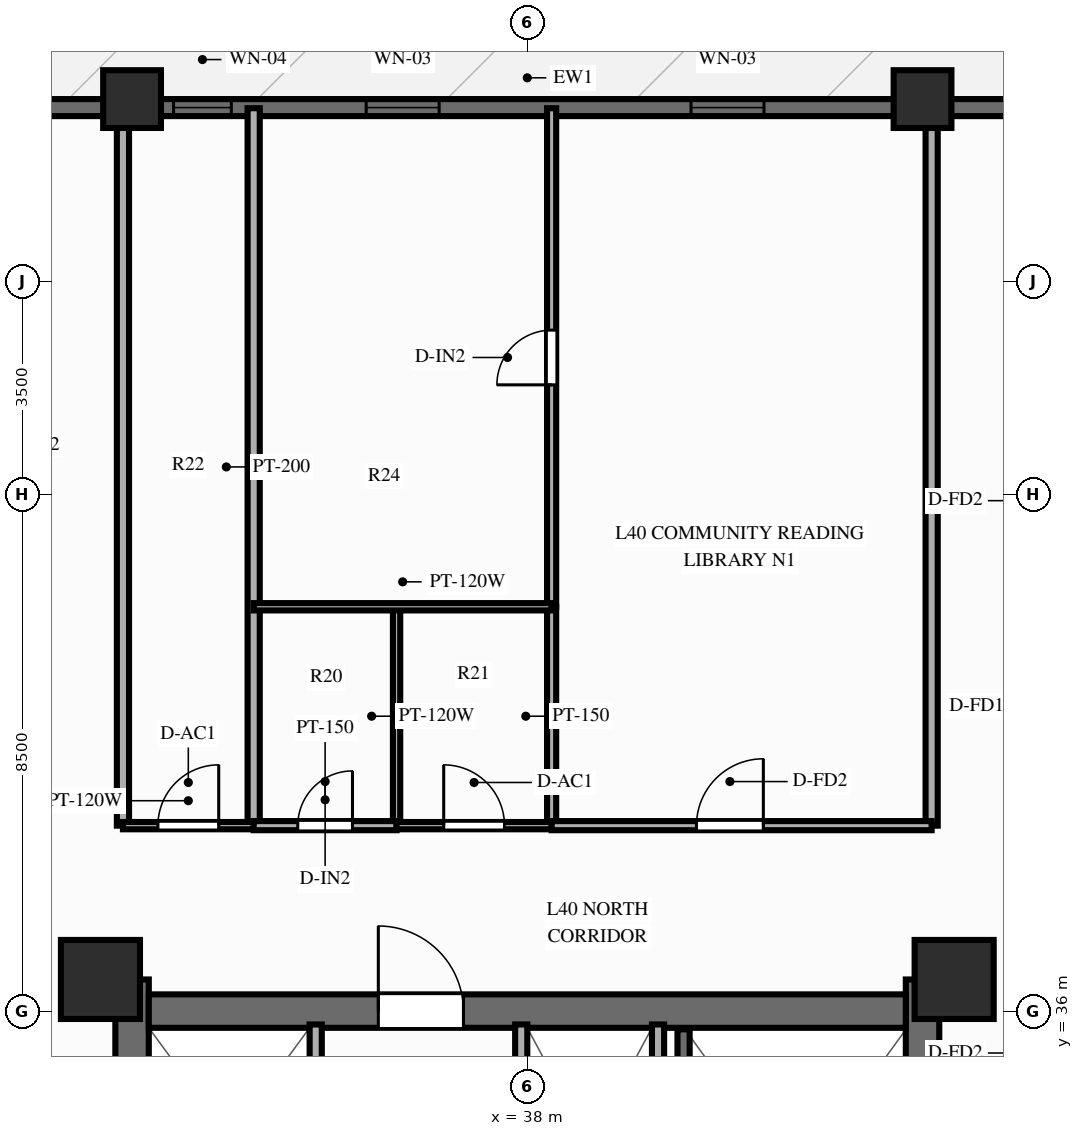
"""IFC4 building model, lengths in metres.
Left out: names, types, materials, properties, quantities, classifications, styles, units other than length and angle.
Written with IfcOpenShell. Run it as: python <this file> out.ifc"""

import sys

from ifc_helpers import new_model, si_unit, direction, frame, frame_2d, origin, origin_2d, place, context, subcontext, project, spatial, rectangle, extrude, source, transform, mapped, element, fill, save


model = new_model("IFC4")
c1 = context("Model", 3, precision=1e-05, world=origin(), true_north=direction((0.0, 1.0)))
c2 = subcontext(c1, "Body", "Model", "MODEL_VIEW")
j1 = project(units=[si_unit("LENGTHUNIT", "METRE"), si_unit("PLANEANGLEUNIT", "RADIAN")], contexts=[c1])
p1 = place(None, origin())
s1 = spatial("IfcSite", under=j1, at=p1, CompositionType="ELEMENT")
p2 = place(p1, origin())
s2 = spatial("IfcBuilding", under=s1, at=p2, CompositionType="ELEMENT")
p3 = place(p2, frame((0.0, 0.0, 126.75)))
s3 = spatial("IfcBuildingStorey", under=s2, at=p3, CompositionType="ELEMENT", Elevation=126.75)
p4 = place(p3, frame((31.5, 17.48, 0.0), z_axis=(0.0, 0.0, 1.0), x_axis=(0.0, 1.0, 0.0)))
e1 = element("IfcWall", 1, at=p4, inside=s3, PredefinedType="SHEAR", context=c2, shape_type="SweptSolid", body=[
    extrude(rectangle(XDim=19.04, YDim=0.55, at=frame_2d((9.52, 0.0))), origin(), (0.0, 0.0, 1.0), 3.0),
])
p5 = place(p4, frame((6.32, 0.0, 0.0)))
e2 = element("IfcOpeningElement", 2, at=p5, cuts=e1, PredefinedType="OPENING", context=c2, shape_type="SweptSolid", body=[
    extrude(rectangle(XDim=1.1, YDim=2.15, at=frame_2d((0.55, 1.075))), frame((0.0, 0.287, 0.0), z_axis=(0.0, -1.0, 0.0), x_axis=(1.0, 0.0, 0.0)), (0.0, 0.0, 1.0), 0.574),
])
p6 = place(p3, frame((44.5, 17.48, 0.0), z_axis=(0.0, 0.0, 1.0), x_axis=(0.0, 1.0, 0.0)))
e3 = element("IfcWall", 3, at=p6, inside=s3, PredefinedType="SHEAR", context=c2, shape_type="SweptSolid", body=[
    extrude(rectangle(XDim=19.04, YDim=0.55, at=frame_2d((9.52, 0.0))), origin(), (0.0, 0.0, 1.0), 3.0),
])
p7 = place(p6, frame((12.67, 0.0, 0.0), z_axis=(0.0, 0.0, 1.0), x_axis=(-1.0, 0.0, 0.0)))
e4 = element("IfcOpeningElement", 4, at=p7, cuts=e3, PredefinedType="OPENING", context=c2, shape_type="SweptSolid", body=[
    extrude(rectangle(XDim=1.1, YDim=2.15, at=frame_2d((0.55, 1.075))), frame((0.0, 0.287, 0.0), z_axis=(0.0, -1.0, 0.0), x_axis=(1.0, 0.0, 0.0)), (0.0, 0.0, 1.0), 0.574),
])
p8 = place(p3, frame((31.775, 36.0, 0.0), z_axis=(0.0, 0.0, 1.0), x_axis=(1.0, 0.0, 0.0)))
e5 = element("IfcWall", 5, at=p8, inside=s3, PredefinedType="SHEAR", context=c2, shape_type="SweptSolid", body=[
    extrude(rectangle(XDim=12.45, YDim=0.55, at=frame_2d((6.225, 0.0))), origin(), (0.0, 0.0, 1.0), 3.0),
])
p9 = place(p8, frame((5.175, 0.0, 0.0), z_axis=(0.0, 0.0, 1.0), x_axis=(-1.0, 0.0, 0.0)))
e6 = element("IfcOpeningElement", 6, at=p9, cuts=e5, PredefinedType="OPENING", context=c2, shape_type="SweptSolid", body=[
    extrude(rectangle(XDim=1.4, YDim=2.15, at=frame_2d((0.7, 1.075))), frame((0.0, 0.287, 0.0), z_axis=(0.0, -1.0, 0.0), x_axis=(1.0, 0.0, 0.0)), (0.0, 0.0, 1.0), 0.574),
])
m1 = source(origin(), c2, "Body", "SweptSolid", [
    extrude(rectangle(XDim=1.3, YDim=1.3, at=origin_2d()), origin(), (0.0, 0.0, 1.0), 3.0),
])
for number, where, z_axis, x_axis in (
    (7, (30.98, 36.52, 0.0), (0.0, 0.0, 1.0), (1.0, 0.0, 0.0)),
    (8, (45.02, 36.52, 0.0), (0.0, 0.0, 1.0), (1.0, 0.0, 0.0)),
):
    element("IfcColumn", number, at=place(p3, frame(where, z_axis=z_axis, x_axis=x_axis)), inside=s3, PredefinedType="COLUMN", context=c2, shape_type="MappedRepresentation", body=[
        mapped(m1, transform((0.0, 0.0, 0.0), scale=1.0)),
    ])
m2 = source(origin(), c2, "Body", "SweptSolid", [
    extrude(rectangle(XDim=0.95, YDim=0.95, at=origin_2d()), origin(), (0.0, 0.0, 1.0), 3.0),
])
for number, where, z_axis, x_axis in (
    (9, (44.5, 51.0, 0.0), (0.0, 0.0, 1.0), (1.0, 0.0, 0.0)),
    (10, (31.5, 51.0, 0.0), (0.0, 0.0, 1.0), (1.0, 0.0, 0.0)),
):
    element("IfcColumn", number, at=place(p3, frame(where, z_axis=z_axis, x_axis=x_axis)), inside=s3, PredefinedType="COLUMN", context=c2, shape_type="MappedRepresentation", body=[
        mapped(m2, transform((0.0, 0.0, 0.0), scale=1.0)),
    ])
p10 = place(p3, frame((16.2, 50.86, 0.0), z_axis=(0.0, 0.0, 1.0), x_axis=(1.0, 0.0, 0.0)))
e11 = element("IfcWall", 11, at=p10, inside=s3, PredefinedType="SOLIDWALL", context=c2, shape_type="SweptSolid", body=[
    extrude(rectangle(XDim=43.6, YDim=0.28, at=frame_2d((21.8, 0.0))), origin(), (0.0, 0.0, 1.0), 2.28),
])
p11 = place(p10, frame((7.1, 0.0, 0.0)))
e12 = element("IfcOpeningElement", 12, at=p11, cuts=e11, PredefinedType="OPENING", context=c2, shape_type="SweptSolid", body=[
    extrude(rectangle(XDim=1.1, YDim=2.15, at=frame_2d((0.55, 1.075))), frame((0.0, 0.152, 0.0), z_axis=(0.0, -1.0, 0.0), x_axis=(1.0, 0.0, 0.0)), (0.0, 0.0, 1.0), 0.304),
])
p12 = place(p10, frame((15.982, 0.0, 0.25)))
e13 = element("IfcOpeningElement", 13, at=p12, cuts=e11, PredefinedType="OPENING", context=c2, shape_type="SweptSolid", body=[
    extrude(rectangle(XDim=0.95, YDim=1.5, at=frame_2d((0.475, 0.75))), frame((0.0, 0.152, 0.0), z_axis=(0.0, -1.0, 0.0), x_axis=(1.0, 0.0, 0.0)), (0.0, 0.0, 1.0), 0.304),
])
p13 = place(p10, frame((19.15, 0.0, 0.25)))
e14 = element("IfcOpeningElement", 14, at=p13, cuts=e11, PredefinedType="OPENING", context=c2, shape_type="SweptSolid", body=[
    extrude(rectangle(XDim=1.2, YDim=1.5, at=frame_2d((0.6, 0.75))), frame((0.0, 0.152, 0.0), z_axis=(0.0, -1.0, 0.0), x_axis=(1.0, 0.0, 0.0)), (0.0, 0.0, 1.0), 0.304),
])
p14 = place(p10, frame((24.492, 0.0, 0.25)))
e15 = element("IfcOpeningElement", 15, at=p14, cuts=e11, PredefinedType="OPENING", context=c2, shape_type="SweptSolid", body=[
    extrude(rectangle(XDim=1.2, YDim=1.5, at=frame_2d((0.6, 0.75))), frame((0.0, 0.152, 0.0), z_axis=(0.0, -1.0, 0.0), x_axis=(1.0, 0.0, 0.0)), (0.0, 0.0, 1.0), 0.304),
])
p15 = place(p10, frame((35.35, 0.0, 0.25)))
e16 = element("IfcOpeningElement", 16, at=p15, cuts=e11, PredefinedType="OPENING", context=c2, shape_type="SweptSolid", body=[
    extrude(rectangle(XDim=1.2, YDim=1.5, at=frame_2d((0.6, 0.75))), frame((0.0, 0.152, 0.0), z_axis=(0.0, -1.0, 0.0), x_axis=(1.0, 0.0, 0.0)), (0.0, 0.0, 1.0), 0.304),
])
p16 = place(p3, frame((40.15, 31.8, 0.0), z_axis=(0.0, 0.0, 1.0), x_axis=(0.0, 1.0, 0.0)))
e17 = element("IfcWall", 17, at=p16, inside=s3, PredefinedType="PARTITIONING", context=c2, shape_type="SweptSolid", body=[
    extrude(rectangle(XDim=3.98, YDim=0.2, at=frame_2d((1.99, 0.0))), origin(), (0.0, 0.0, 1.0), 2.79),
])
p17 = place(p3, frame((40.57, 28.65, 0.0), z_axis=(0.0, 0.0, 1.0), x_axis=(0.0, 1.0, 0.0)))
e18 = element("IfcWall", 18, at=p17, inside=s3, PredefinedType="SOLIDWALL", context=c2, shape_type="SweptSolid", body=[
    extrude(rectangle(XDim=7.05, YDim=0.2, at=frame_2d((3.525, 0.0))), origin(), (0.0, 0.0, 1.0), 2.79),
])
p18 = place(p3, frame((34.52, 25.44, 0.0), z_axis=(0.0, 0.0, 1.0), x_axis=(0.0, 1.0, 0.0)))
e19 = element("IfcWall", 19, at=p18, inside=s3, PredefinedType="PARTITIONING", context=c2, shape_type="SweptSolid", body=[
    extrude(rectangle(XDim=10.34, YDim=0.2, at=frame_2d((5.17, 0.0))), origin(), (0.0, 0.0, 1.0), 2.79),
])
p19 = place(p18, frame((0.65, 0.0, 0.0)))
e20 = element("IfcOpeningElement", 20, at=p19, cuts=e19, PredefinedType="OPENING", context=c2, shape_type="SweptSolid", body=[
    extrude(rectangle(XDim=0.8, YDim=2.05, at=frame_2d((0.4, 1.025))), frame((0.0, 0.112, 0.0), z_axis=(0.0, -1.0, 0.0), x_axis=(1.0, 0.0, 0.0)), (0.0, 0.0, 1.0), 0.224),
])
p20 = place(p18, frame((2.75, 0.0, 0.0)))
e21 = element("IfcOpeningElement", 21, at=p20, cuts=e19, PredefinedType="OPENING", context=c2, shape_type="SweptSolid", body=[
    extrude(rectangle(XDim=0.8, YDim=2.05, at=frame_2d((0.4, 1.025))), frame((0.0, 0.112, 0.0), z_axis=(0.0, -1.0, 0.0), x_axis=(1.0, 0.0, 0.0)), (0.0, 0.0, 1.0), 0.224),
])
p21 = place(p18, frame((4.95, 0.0, 0.0)))
e22 = element("IfcOpeningElement", 22, at=p21, cuts=e19, PredefinedType="OPENING", context=c2, shape_type="SweptSolid", body=[
    extrude(rectangle(XDim=0.8, YDim=2.05, at=frame_2d((0.4, 1.025))), frame((0.0, 0.112, 0.0), z_axis=(0.0, -1.0, 0.0), x_axis=(1.0, 0.0, 0.0)), (0.0, 0.0, 1.0), 0.224),
])
p22 = place(p3, frame((37.9, 25.44, 0.0), z_axis=(0.0, 0.0, 1.0), x_axis=(0.0, 1.0, 0.0)))
e23 = element("IfcWall", 23, at=p22, inside=s3, PredefinedType="PARTITIONING", context=c2, shape_type="SweptSolid", body=[
    extrude(rectangle(XDim=10.34, YDim=0.2, at=frame_2d((5.17, 0.0))), origin(), (0.0, 0.0, 1.0), 2.79),
])
p23 = place(p22, frame((0.32, 0.0, 0.0)))
e24 = element("IfcOpeningElement", 24, at=p23, cuts=e23, PredefinedType="OPENING", context=c2, shape_type="SweptSolid", body=[
    extrude(rectangle(XDim=1.0, YDim=2.15, at=frame_2d((0.5, 1.075))), frame((0.0, 0.112, 0.0), z_axis=(0.0, -1.0, 0.0), x_axis=(1.0, 0.0, 0.0)), (0.0, 0.0, 1.0), 0.224),
])
p24 = place(p22, frame((1.71, 0.0, 0.0)))
e25 = element("IfcOpeningElement", 25, at=p24, cuts=e23, PredefinedType="OPENING", context=c2, shape_type="SweptSolid", body=[
    extrude(rectangle(XDim=1.0, YDim=2.15, at=frame_2d((0.5, 1.075))), frame((0.0, 0.112, 0.0), z_axis=(0.0, -1.0, 0.0), x_axis=(1.0, 0.0, 0.0)), (0.0, 0.0, 1.0), 0.224),
])
p25 = place(p22, frame((3.51, 0.0, 0.0)))
e26 = element("IfcOpeningElement", 26, at=p25, cuts=e23, PredefinedType="OPENING", context=c2, shape_type="SweptSolid", body=[
    extrude(rectangle(XDim=1.0, YDim=2.15, at=frame_2d((0.5, 1.075))), frame((0.0, 0.112, 0.0), z_axis=(0.0, -1.0, 0.0), x_axis=(1.0, 0.0, 0.0)), (0.0, 0.0, 1.0), 0.224),
])
p26 = place(p22, frame((5.01, 0.0, 0.0)))
e27 = element("IfcOpeningElement", 27, at=p26, cuts=e23, PredefinedType="OPENING", context=c2, shape_type="SweptSolid", body=[
    extrude(rectangle(XDim=1.0, YDim=2.15, at=frame_2d((0.5, 1.075))), frame((0.0, 0.112, 0.0), z_axis=(0.0, -1.0, 0.0), x_axis=(1.0, 0.0, 0.0)), (0.0, 0.0, 1.0), 0.224),
])
for number, where, z_axis, x_axis in (
    (28, (31.35, 39.05, 0.0), (0.0, 0.0, 1.0), (0.0, 1.0, 0.0)),
    (29, (44.65, 39.05, 0.0), (0.0, 0.0, 1.0), (0.0, 1.0, 0.0)),
):
    element("IfcWall", number, at=place(p3, frame(where, z_axis=z_axis, x_axis=x_axis)), inside=s3, PredefinedType="PARTITIONING", context=c2, shape_type="SweptSolid", body=[
        extrude(rectangle(XDim=11.8, YDim=0.2, at=frame_2d((5.9, 0.0))), origin(), (0.0, 0.0, 1.0), 2.34),
    ])
p27 = place(p3, frame((33.5, 39.05, 0.0), z_axis=(0.0, 0.0, 1.0), x_axis=(0.0, 1.0, 0.0)))
e30 = element("IfcWall", 30, at=p27, inside=s3, PredefinedType="PARTITIONING", context=c2, shape_type="SweptSolid", body=[
    extrude(rectangle(XDim=11.8, YDim=0.2, at=frame_2d((5.9, 0.0))), origin(), (0.0, 0.0, 1.0), 2.79),
])
p28 = place(p3, frame((31.35, 39.05, 0.0), z_axis=(0.0, 0.0, 1.0), x_axis=(1.0, 0.0, 0.0)))
e31 = element("IfcWall", 31, at=p28, inside=s3, PredefinedType="PARTITIONING", context=c2, shape_type="SweptSolid", body=[
    extrude(rectangle(XDim=2.15, YDim=0.12, at=frame_2d((1.075, 0.0))), origin(), (0.0, 0.0, 1.0), 2.79),
])
p29 = place(p28, frame((0.575, 0.0, 0.0)))
e32 = element("IfcOpeningElement", 32, at=p29, cuts=e31, PredefinedType="OPENING", context=c2, shape_type="SweptSolid", body=[
    extrude(rectangle(XDim=1.0, YDim=2.1, at=frame_2d((0.5, 1.05))), frame((0.0, 0.072, 0.0), z_axis=(0.0, -1.0, 0.0), x_axis=(1.0, 0.0, 0.0)), (0.0, 0.0, 1.0), 0.144),
])
p30 = place(p3, frame((35.85, 39.05, 0.0), z_axis=(0.0, 0.0, 1.0), x_axis=(0.0, 1.0, 0.0)))
e33 = element("IfcWall", 33, at=p30, inside=s3, PredefinedType="PARTITIONING", context=c2, shape_type="SweptSolid", body=[
    extrude(rectangle(XDim=3.6, YDim=0.12, at=frame_2d((1.8, 0.0))), origin(), (0.0, 0.0, 1.0), 2.79),
])
p31 = place(p3, frame((38.4, 39.05, 0.0), z_axis=(0.0, 0.0, 1.0), x_axis=(0.0, 1.0, 0.0)))
e34 = element("IfcWall", 34, at=p31, inside=s3, PredefinedType="PARTITIONING", context=c2, shape_type="SweptSolid", body=[
    extrude(rectangle(XDim=3.6, YDim=0.15, at=frame_2d((1.8, 0.0))), origin(), (0.0, 0.0, 1.0), 2.79),
])
p32 = place(p3, frame((38.4, 42.65, 0.0), z_axis=(0.0, 0.0, 1.0), x_axis=(0.0, 1.0, 0.0)))
e35 = element("IfcWall", 35, at=p32, inside=s3, PredefinedType="PARTITIONING", context=c2, shape_type="SweptSolid", body=[
    extrude(rectangle(XDim=8.2, YDim=0.15, at=frame_2d((4.1, 0.0))), origin(), (0.0, 0.0, 1.0), 2.79),
])
p33 = place(p32, frame((3.65, 0.0, 0.0)))
e36 = element("IfcOpeningElement", 36, at=p33, cuts=e35, PredefinedType="OPENING", context=c2, shape_type="SweptSolid", body=[
    extrude(rectangle(XDim=0.9, YDim=2.1, at=frame_2d((0.45, 1.05))), frame((0.0, 0.087, 0.0), z_axis=(0.0, -1.0, 0.0), x_axis=(1.0, 0.0, 0.0)), (0.0, 0.0, 1.0), 0.174),
])
p34 = place(p3, frame((33.5, 42.65, 0.0), z_axis=(0.0, 0.0, 1.0), x_axis=(1.0, 0.0, 0.0)))
e37 = element("IfcWall", 37, at=p34, inside=s3, PredefinedType="PARTITIONING", context=c2, shape_type="SweptSolid", body=[
    extrude(rectangle(XDim=4.9, YDim=0.12, at=frame_2d((2.45, 0.0))), origin(), (0.0, 0.0, 1.0), 2.79),
])
p35 = place(p3, frame((33.5, 39.05, 0.0), z_axis=(0.0, 0.0, 1.0), x_axis=(1.0, 0.0, 0.0)))
e38 = element("IfcWall", 38, at=p35, inside=s3, PredefinedType="PARTITIONING", context=c2, shape_type="SweptSolid", body=[
    extrude(rectangle(XDim=2.35, YDim=0.15, at=frame_2d((1.175, 0.0))), origin(), (0.0, 0.0, 1.0), 2.79),
])
p36 = place(p35, frame((0.725, 0.0, 0.0)))
e39 = element("IfcOpeningElement", 39, at=p36, cuts=e38, PredefinedType="OPENING", context=c2, shape_type="SweptSolid", body=[
    extrude(rectangle(XDim=0.9, YDim=2.1, at=frame_2d((0.45, 1.05))), frame((0.0, 0.087, 0.0), z_axis=(0.0, -1.0, 0.0), x_axis=(1.0, 0.0, 0.0)), (0.0, 0.0, 1.0), 0.174),
])
p37 = place(p3, frame((35.85, 39.05, 0.0), z_axis=(0.0, 0.0, 1.0), x_axis=(1.0, 0.0, 0.0)))
e40 = element("IfcWall", 40, at=p37, inside=s3, PredefinedType="PARTITIONING", context=c2, shape_type="SweptSolid", body=[
    extrude(rectangle(XDim=2.55, YDim=0.12, at=frame_2d((1.275, 0.0))), origin(), (0.0, 0.0, 1.0), 2.79),
])
p38 = place(p37, frame((0.775, 0.0, 0.0)))
e41 = element("IfcOpeningElement", 41, at=p38, cuts=e40, PredefinedType="OPENING", context=c2, shape_type="SweptSolid", body=[
    extrude(rectangle(XDim=1.0, YDim=2.1, at=frame_2d((0.5, 1.05))), frame((0.0, 0.072, 0.0), z_axis=(0.0, -1.0, 0.0), x_axis=(1.0, 0.0, 0.0)), (0.0, 0.0, 1.0), 0.144),
])
p39 = place(p3, frame((38.4, 39.05, 0.0), z_axis=(0.0, 0.0, 1.0), x_axis=(1.0, 0.0, 0.0)))
e42 = element("IfcWall", 42, at=p39, inside=s3, PredefinedType="PARTITIONING", context=c2, shape_type="SweptSolid", body=[
    extrude(rectangle(XDim=6.25, YDim=0.15, at=frame_2d((3.125, 0.0))), origin(), (0.0, 0.0, 1.0), 2.79),
])
p40 = place(p39, frame((2.382, 0.0, 0.0)))
e43 = element("IfcOpeningElement", 43, at=p40, cuts=e42, PredefinedType="OPENING", context=c2, shape_type="SweptSolid", body=[
    extrude(rectangle(XDim=1.1, YDim=2.15, at=frame_2d((0.55, 1.075))), frame((0.0, 0.087, 0.0), z_axis=(0.0, -1.0, 0.0), x_axis=(1.0, 0.0, 0.0)), (0.0, 0.0, 1.0), 0.174),
])
m3 = source(origin(), c2, "Body", "SweptSolid", [
    extrude(rectangle(XDim=0.95, YDim=1.5, at=frame_2d((0.475, 0.75))), frame((0.0, 0.03, 0.0), z_axis=(0.0, -1.0, 0.0), x_axis=(1.0, 0.0, 0.0)), (0.0, 0.0, 1.0), 0.06),
])
p41 = place(p12, origin())
e44 = element("IfcWindow", 44, at=p41, inside=s3, PartitioningType="SINGLE_PANEL", PredefinedType="WINDOW", context=c2, shape_type="MappedRepresentation", body=[
    mapped(m3, transform((0.0, 0.0, 0.0), scale=1.0)),
])
fill(e13, e44)
m4 = source(origin(), c2, "Body", "SweptSolid", [
    extrude(rectangle(XDim=1.2, YDim=1.5, at=frame_2d((0.6, 0.75))), frame((0.0, 0.03, 0.0), z_axis=(0.0, -1.0, 0.0), x_axis=(1.0, 0.0, 0.0)), (0.0, 0.0, 1.0), 0.06),
])
p42 = place(p13, origin())
e45 = element("IfcWindow", 45, at=p42, inside=s3, PartitioningType="SINGLE_PANEL", PredefinedType="WINDOW", context=c2, shape_type="MappedRepresentation", body=[
    mapped(m4, transform((0.0, 0.0, 0.0), scale=1.0)),
])
fill(e14, e45)
p43 = place(p14, origin())
e46 = element("IfcWindow", 46, at=p43, inside=s3, PartitioningType="SINGLE_PANEL", PredefinedType="WINDOW", context=c2, shape_type="MappedRepresentation", body=[
    mapped(m4, transform((0.0, 0.0, 0.0), scale=1.0)),
])
fill(e15, e46)
m5 = source(origin(), c2, "Body", "SweptSolid", [
    extrude(rectangle(XDim=1.4, YDim=2.15, at=frame_2d((0.7, 1.075))), frame((0.0, 0.025, 0.0), z_axis=(0.0, -1.0, 0.0), x_axis=(1.0, 0.0, 0.0)), (0.0, 0.0, 1.0), 0.05),
])
p44 = place(p9, origin())
e47 = element("IfcDoor", 47, at=p44, inside=s3, OperationType="SINGLE_SWING_RIGHT", PredefinedType="DOOR", context=c2, shape_type="MappedRepresentation", body=[
    mapped(m5, transform((0.0, 0.0, 0.0), scale=1.0)),
])
fill(e6, e47)
m6 = source(origin(), c2, "Body", "SweptSolid", [
    extrude(rectangle(XDim=1.0, YDim=2.1, at=frame_2d((0.5, 1.05))), frame((0.0, 0.025, 0.0), z_axis=(0.0, -1.0, 0.0), x_axis=(1.0, 0.0, 0.0)), (0.0, 0.0, 1.0), 0.05),
])
p45 = place(p29, origin())
e48 = element("IfcDoor", 48, at=p45, inside=s3, OperationType="SINGLE_SWING_RIGHT", PredefinedType="DOOR", context=c2, shape_type="MappedRepresentation", body=[
    mapped(m6, transform((0.0, 0.0, 0.0), scale=1.0)),
])
fill(e32, e48)
m7 = source(origin(), c2, "Body", "SweptSolid", [
    extrude(rectangle(XDim=0.9, YDim=2.1, at=frame_2d((0.45, 1.05))), frame((0.0, 0.025, 0.0), z_axis=(0.0, -1.0, 0.0), x_axis=(1.0, 0.0, 0.0)), (0.0, 0.0, 1.0), 0.05),
])
p46 = place(p33, origin())
e49 = element("IfcDoor", 49, at=p46, inside=s3, OperationType="SINGLE_SWING_LEFT", PredefinedType="DOOR", context=c2, shape_type="MappedRepresentation", body=[
    mapped(m7, transform((0.0, 0.0, 0.0), scale=1.0)),
])
fill(e36, e49)
p47 = place(p36, origin())
e50 = element("IfcDoor", 50, at=p47, inside=s3, OperationType="SINGLE_SWING_RIGHT", PredefinedType="DOOR", context=c2, shape_type="MappedRepresentation", body=[
    mapped(m7, transform((0.0, 0.0, 0.0), scale=1.0)),
])
fill(e39, e50)
p48 = place(p38, origin())
e51 = element("IfcDoor", 51, at=p48, inside=s3, OperationType="SINGLE_SWING_LEFT", PredefinedType="DOOR", context=c2, shape_type="MappedRepresentation", body=[
    mapped(m6, transform((0.0, 0.0, 0.0), scale=1.0)),
])
fill(e41, e51)
m8 = source(origin(), c2, "Body", "SweptSolid", [
    extrude(rectangle(XDim=1.1, YDim=2.15, at=frame_2d((0.55, 1.075))), frame((0.0, 0.025, 0.0), z_axis=(0.0, -1.0, 0.0), x_axis=(1.0, 0.0, 0.0)), (0.0, 0.0, 1.0), 0.05),
])
p49 = place(p40, origin())
e52 = element("IfcDoor", 52, at=p49, inside=s3, OperationType="SINGLE_SWING_RIGHT", PredefinedType="DOOR", context=c2, shape_type="MappedRepresentation", body=[
    mapped(m8, transform((0.0, 0.0, 0.0), scale=1.0)),
])
fill(e43, e52)
save(model, sys.argv[1])
